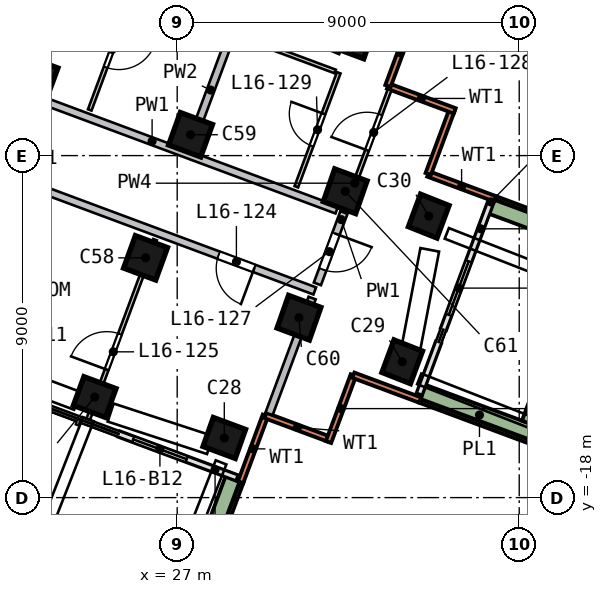
"""IFC4 building model, lengths in metres.
Left out: names, types, materials, properties, quantities, classifications, styles, units other than length and angle.
Written with IfcOpenShell. Run it as: python <this file> out.ifc"""

import sys

from ifc_helpers import new_model, si_unit, direction, frame, frame_2d, origin, origin_2d, place, context, subcontext, project, spatial, rectangle, extrude, element, fill, save


model = new_model("IFC4")
c1 = context("Model", 3, precision=1e-05, world=origin(), true_north=direction((0.0, 1.0)))
c2 = subcontext(c1, "Body", "Model", "MODEL_VIEW")
j1 = project(units=[si_unit("LENGTHUNIT", "METRE"), si_unit("PLANEANGLEUNIT", "RADIAN")], contexts=[c1])
p1 = place(None, origin())
s1 = spatial("IfcSite", under=j1, at=p1, CompositionType="ELEMENT")
p2 = place(p1, origin())
s2 = spatial("IfcBuilding", under=s1, at=p2, CompositionType="ELEMENT")
p3 = place(p2, frame((0.0, 0.0, 71.5)))
s3 = spatial("IfcBuildingStorey", under=s2, at=p3, CompositionType="ELEMENT", Elevation=71.5)
p4 = place(p3, frame((24.814, -15.523, 0.0), z_axis=(0.012570341, 0.13940186, 0.990156103), x_axis=(0.938411837, -0.343589736, 0.036459798)))
e1 = element("IfcColumn", 1, at=p4, inside=s3, PredefinedType="COLUMN", context=c2, shape_type="SweptSolid", body=[
    extrude(rectangle(XDim=0.9, YDim=0.8, at=origin_2d()), origin(), (0.0, 0.0, 1.0), 3.03),
])
p5 = place(p3, frame((28.29, -16.645, 0.0), z_axis=(-0.041940039, 0.175924056, 0.983509918), x_axis=(0.93778719, -0.332650547, 0.099492708)))
e2 = element("IfcColumn", 2, at=p5, inside=s3, PredefinedType="COLUMN", context=c2, shape_type="SweptSolid", body=[
    extrude(rectangle(XDim=0.9, YDim=0.8, at=origin_2d()), origin(), (0.0, 0.0, 1.0), 3.05),
])
p6 = place(p3, frame((32.984, -14.667, 0.0), z_axis=(-0.051152076, 0.197039072, 0.979060299), x_axis=(0.362492013, 0.917149263, -0.165640483)))
e3 = element("IfcColumn", 3, at=p6, inside=s3, PredefinedType="COLUMN", context=c2, shape_type="SweptSolid", body=[
    extrude(rectangle(XDim=0.9, YDim=0.8, at=origin_2d()), origin(), (0.0, 0.0, 1.0), 3.064),
])
p7 = place(p3, frame((33.704, -10.838, 0.0), z_axis=(-0.069039394, 0.19995972, 0.97736875), x_axis=(0.364959103, 0.916856458, -0.161799531)))
e4 = element("IfcColumn", 4, at=p7, inside=s3, PredefinedType="COLUMN", context=c2, shape_type="SweptSolid", body=[
    extrude(rectangle(XDim=0.9, YDim=0.8, at=origin_2d()), origin(), (0.0, 0.0, 1.0), 3.07),
])
p8 = place(p3, frame((31.726, -6.144, 0.0), z_axis=(-0.09100032, 0.190512033, 0.977457982), x_axis=(-0.934329354, 0.323309002, -0.149999824)))
e5 = element("IfcColumn", 5, at=p8, inside=s3, PredefinedType="COLUMN", context=c2, shape_type="SweptSolid", body=[
    extrude(rectangle(XDim=0.9, YDim=0.8, at=origin_2d()), origin(), (0.0, 0.0, 1.0), 3.069),
])
p9 = place(p3, frame((23.242, -7.097, 0.0), z_axis=(0.032819221, 0.110744661, 0.99330686), x_axis=(0.937521118, -0.347840819, 0.007805041)))
e6 = element("IfcColumn", 6, at=p9, inside=s3, PredefinedType="COLUMN", context=c2, shape_type="SweptSolid", body=[
    extrude(rectangle(XDim=0.9, YDim=0.9, at=origin_2d()), origin(), (0.0, 0.0, 1.0), 3.02),
])
p10 = place(p3, frame((26.173, -11.867, 0.0), z_axis=(-0.004750179, 0.145645326, 0.989325465), x_axis=(0.93834252, -0.341342946, 0.054756803)))
e7 = element("IfcColumn", 7, at=p10, inside=s3, PredefinedType="COLUMN", context=c2, shape_type="SweptSolid", body=[
    extrude(rectangle(XDim=0.9, YDim=0.9, at=origin_2d()), origin(), (0.0, 0.0, 1.0), 3.032),
])
p11 = place(p3, frame((27.375, -8.634, 0.0), z_axis=(-0.020107707, 0.150968666, 0.988334024), x_axis=(0.938195697, -0.338778763, 0.070836317)))
e8 = element("IfcColumn", 8, at=p11, inside=s3, PredefinedType="COLUMN", context=c2, shape_type="SweptSolid", body=[
    extrude(rectangle(XDim=0.9, YDim=0.9, at=origin_2d()), origin(), (0.0, 0.0, 1.0), 3.035),
])
p12 = place(p3, frame((30.274, -13.491, 0.0), z_axis=(-0.056771025, 0.184685488, 0.981156624), x_axis=(0.937151089, -0.329021737, 0.116157365)))
e9 = element("IfcColumn", 9, at=p12, inside=s3, PredefinedType="COLUMN", context=c2, shape_type="SweptSolid", body=[
    extrude(rectangle(XDim=0.9, YDim=0.9, at=origin_2d()), origin(), (0.0, 0.0, 1.0), 3.058),
])
p13 = place(p3, frame((31.509, -10.171, 0.0), z_axis=(-0.072272343, 0.189884226, 0.979142834), x_axis=(0.936136292, -0.325807394, 0.132281465)))
e10 = element("IfcColumn", 10, at=p13, inside=s3, PredefinedType="COLUMN", context=c2, shape_type="SweptSolid", body=[
    extrude(rectangle(XDim=0.9, YDim=0.9, at=origin_2d()), origin(), (0.0, 0.0, 1.0), 3.064),
])
p14 = place(p3, frame((28.667, -17.596, 0.0), z_axis=(0.0, 0.0, 1.0), x_axis=(0.34858209, 0.937278254, 0.0)))
e11 = element("IfcWall", 11, at=p14, inside=s3, PredefinedType="SOLIDWALL", context=c2, shape_type="SweptSolid", body=[
    extrude(rectangle(XDim=1.875, YDim=0.15, at=frame_2d((0.938, 0.0))), origin(), (0.0, 0.0, 1.0), 3.0),
])
p15 = place(p3, frame((29.321, -15.839, 0.0), z_axis=(0.0, 0.0, 1.0), x_axis=(0.93728987, -0.348550856, 0.0)))
e12 = element("IfcWall", 12, at=p15, inside=s3, PredefinedType="SOLIDWALL", context=c2, shape_type="SweptSolid", body=[
    extrude(rectangle(XDim=1.8, YDim=0.15, at=frame_2d((0.9, 0.0))), origin(), (0.0, 0.0, 1.0), 3.0),
])
for number, where, z_axis, x_axis in (
    (13, (30.982, -16.537, 0.0), (0.0, 0.0, 1.0), (0.349, 0.937, 0.0)),
    (14, (31.636, -14.779, 0.0), (0.0, 0.0, 1.0), (0.937, -0.349, 0.0)),
):
    element("IfcWall", number, at=place(p3, frame(where, z_axis=z_axis, x_axis=x_axis)), inside=s3, PredefinedType="SOLIDWALL", context=c2, shape_type="SweptSolid", body=[
        extrude(rectangle(XDim=1.875, YDim=0.15, at=frame_2d((0.938, 0.0))), origin(), (0.0, 0.0, 1.0), 3.0),
    ])
p16 = place(p3, frame((35.363, -10.137, 0.0), z_axis=(0.0, 0.0, 1.0), x_axis=(-0.937294074, 0.348539552, 0.0)))
e15 = element("IfcWall", 15, at=p16, inside=s3, PredefinedType="SOLIDWALL", context=c2, shape_type="SweptSolid", body=[
    extrude(rectangle(XDim=1.875, YDim=0.15, at=frame_2d((0.938, 0.0))), origin(), (0.0, 0.0, 1.0), 3.0),
])
p17 = place(p3, frame((33.605, -9.484, 0.0), z_axis=(0.0, 0.0, 1.0), x_axis=(0.348550856, 0.93728987, 0.0)))
e16 = element("IfcWall", 16, at=p17, inside=s3, PredefinedType="SOLIDWALL", context=c2, shape_type="SweptSolid", body=[
    extrude(rectangle(XDim=1.8, YDim=0.15, at=frame_2d((0.9, 0.0))), origin(), (0.0, 0.0, 1.0), 3.0),
])
for number, where, z_axis, x_axis in (
    (17, (34.303, -7.823, 0.0), (0.0, 0.0, 1.0), (-0.937, 0.349, 0.0)),
    (18, (32.545, -7.169, 0.0), (0.0, 0.0, 1.0), (0.349, 0.937, 0.0)),
):
    element("IfcWall", number, at=place(p3, frame(where, z_axis=z_axis, x_axis=x_axis)), inside=s3, PredefinedType="SOLIDWALL", context=c2, shape_type="SweptSolid", body=[
        extrude(rectangle(XDim=1.875, YDim=0.15, at=frame_2d((0.938, 0.0))), origin(), (0.0, 0.0, 1.0), 3.0),
    ])
p18 = place(p3, frame((25.468, -16.326, 0.0), z_axis=(0.0, 0.0, 1.0), x_axis=(0.937293311, -0.348541603, 0.0)))
e19 = element("IfcWall", 19, at=p18, inside=s3, PredefinedType="SOLIDWALL", context=c2, shape_type="SweptSolid", body=[
    extrude(rectangle(XDim=3.297, YDim=0.15, at=frame_2d((1.648, 0.0))), origin(), (0.0, 0.0, 1.0), 2.935),
])
p19 = place(p18, frame((0.4, 0.0, 0.0)))
e20 = element("IfcOpeningElement", 20, at=p19, cuts=e19, PredefinedType="OPENING", context=c2, shape_type="SweptSolid", body=[
    extrude(rectangle(XDim=1.5, YDim=2.4, at=frame_2d((0.75, 1.2))), frame((0.0, 0.085, 0.0), z_axis=(0.0, -1.0, 0.0), x_axis=(1.0, 0.0, 0.0)), (0.0, 0.0, 1.0), 0.17),
])
p20 = place(p3, frame((34.008, -13.565, 0.0), z_axis=(0.0, 0.0, 1.0), x_axis=(0.348575473, 0.937280716, 0.0)))
e21 = element("IfcWall", 21, at=p20, inside=s3, PredefinedType="SOLIDWALL", context=c2, shape_type="SweptSolid", body=[
    extrude(rectangle(XDim=3.53, YDim=0.15, at=frame_2d((1.765, 0.0))), origin(), (0.0, 0.0, 1.0), 2.935),
])
p21 = place(p20, frame((0.4, 0.0, 0.0)))
e22 = element("IfcOpeningElement", 22, at=p21, cuts=e21, PredefinedType="OPENING", context=c2, shape_type="SweptSolid", body=[
    extrude(rectangle(XDim=1.5, YDim=2.4, at=frame_2d((0.75, 1.2))), frame((0.0, 0.085, 0.0), z_axis=(0.0, -1.0, 0.0), x_axis=(1.0, 0.0, 0.0)), (0.0, 0.0, 1.0), 0.17),
])
p22 = place(p3, frame((33.377, -15.261, 0.0), z_axis=(0.0, 0.0, 1.0), x_axis=(0.348636151, 0.937258147, 0.0)))
e23 = element("IfcWall", 23, at=p22, inside=s3, PredefinedType="SOLIDWALL", context=c2, shape_type="SweptSolid", body=[
    extrude(rectangle(XDim=1.431, YDim=0.15, at=frame_2d((0.716, 0.0))), origin(), (0.0, 0.0, 1.0), 2.935),
])
p23 = place(p3, frame((21.175, -17.957, 0.0), z_axis=(0.0, 0.0, 1.0), x_axis=(0.937276934, -0.348585642, 0.0)))
e24 = element("IfcWall", 24, at=p23, inside=s3, PredefinedType="SOLIDWALL", context=c2, shape_type="SweptSolid", body=[
    extrude(rectangle(XDim=6.972, YDim=0.5, at=frame_2d((3.486, 0.0))), origin(), (0.0, 0.0, 1.0), 0.7),
])
p24 = place(p3, frame((27.562, -20.066, 0.0), z_axis=(0.0, 0.0, 1.0), x_axis=(0.348604368, 0.937269969, 0.0)))
e25 = element("IfcWall", 25, at=p24, inside=s3, PredefinedType="SOLIDWALL", context=c2, shape_type="SweptSolid", body=[
    extrude(rectangle(XDim=2.699, YDim=0.5, at=frame_2d((1.35, 0.0))), origin(), (0.0, 0.0, 1.0), 0.7),
])
p25 = place(p3, frame((33.455, -15.269, 0.0), z_axis=(0.0, 0.0, 1.0), x_axis=(0.937263611, -0.348621462, 0.0)))
e26 = element("IfcWall", 26, at=p25, inside=s3, PredefinedType="SOLIDWALL", context=c2, shape_type="SweptSolid", body=[
    extrude(rectangle(XDim=3.199, YDim=0.5, at=frame_2d((1.6, 0.0))), origin(), (0.0, 0.0, 1.0), 0.7),
])
p26 = place(p3, frame((36.306, -16.063, 0.0), z_axis=(0.0, 0.0, 1.0), x_axis=(0.348572797, 0.937281711, 0.0)))
e27 = element("IfcWall", 27, at=p26, inside=s3, PredefinedType="SOLIDWALL", context=c2, shape_type="SweptSolid", body=[
    extrude(rectangle(XDim=5.3, YDim=0.5, at=frame_2d((2.65, 0.0))), origin(), (0.0, 0.0, 1.0), 0.7),
])
p27 = place(p3, frame((37.832, -11.242, 0.0), z_axis=(0.0, 0.0, 1.0), x_axis=(-0.937258975, 0.348633924, 0.0)))
e28 = element("IfcWall", 28, at=p27, inside=s3, PredefinedType="SOLIDWALL", context=c2, shape_type="SweptSolid", body=[
    extrude(rectangle(XDim=2.699, YDim=0.5, at=frame_2d((1.35, 0.0))), origin(), (0.0, 0.0, 1.0), 0.7),
])
p28 = place(p3, frame((30.62, -12.561, 0.0), z_axis=(0.0, 0.0, 1.0), x_axis=(-0.937284552, 0.348565156, 0.0)))
e29 = element("IfcWall", 29, at=p28, inside=s3, PredefinedType="SOLIDWALL", context=c2, shape_type="SweptSolid", body=[
    extrude(rectangle(XDim=15.12, YDim=0.2, at=frame_2d((7.56, 0.0))), origin(), (0.0, 0.0, 1.0), 3.0),
])
p29 = place(p28, frame((1.7, 0.0, 0.0)))
e30 = element("IfcOpeningElement", 30, at=p29, cuts=e29, PredefinedType="OPENING", context=c2, shape_type="SweptSolid", body=[
    extrude(rectangle(XDim=1.0, YDim=2.1, at=frame_2d((0.5, 1.05))), frame((0.0, 0.11, 0.0), z_axis=(0.0, -1.0, 0.0), x_axis=(1.0, 0.0, 0.0)), (0.0, 0.0, 1.0), 0.22),
])
p30 = place(p3, frame((17.028, -5.159, 0.0), z_axis=(0.0, 0.0, 1.0), x_axis=(0.937277315, -0.348584617, 0.0)))
e31 = element("IfcWall", 31, at=p30, inside=s3, PredefinedType="SOLIDWALL", context=c2, shape_type="SweptSolid", body=[
    extrude(rectangle(XDim=15.12, YDim=0.2, at=frame_2d((7.56, 0.0))), origin(), (0.0, 0.0, 1.0), 3.0),
])
p31 = place(p30, frame((3.55, 0.0, 0.0)))
e32 = element("IfcOpeningElement", 32, at=p31, cuts=e31, PredefinedType="OPENING", context=c2, shape_type="SweptSolid", body=[
    extrude(rectangle(XDim=1.0, YDim=2.1, at=frame_2d((0.5, 1.05))), frame((0.0, 0.11, 0.0), z_axis=(0.0, -1.0, 0.0), x_axis=(1.0, 0.0, 0.0)), (0.0, 0.0, 1.0), 0.22),
])
p32 = place(p3, frame((31.388, -10.497, 0.0), z_axis=(0.0, 0.0, 1.0), x_axis=(-0.348571934, -0.937282031, 0.0)))
e33 = element("IfcWall", 33, at=p32, inside=s3, PredefinedType="SOLIDWALL", context=c2, shape_type="SweptSolid", body=[
    extrude(rectangle(XDim=2.004, YDim=0.2, at=frame_2d((1.002, 0.0))), origin(), (0.0, 0.0, 1.0), 3.0),
])
p33 = place(p32, frame((0.6, 0.0, 0.0)))
e34 = element("IfcOpeningElement", 34, at=p33, cuts=e33, PredefinedType="OPENING", context=c2, shape_type="SweptSolid", body=[
    extrude(rectangle(XDim=1.0, YDim=2.1, at=frame_2d((0.5, 1.05))), frame((0.0, 0.11, 0.0), z_axis=(0.0, -1.0, 0.0), x_axis=(1.0, 0.0, 0.0)), (0.0, 0.0, 1.0), 0.22),
])
p34 = place(p3, frame((27.323, -8.774, 0.0), z_axis=(0.0, 0.0, 1.0), x_axis=(0.348521741, 0.937300697, 0.0)))
e35 = element("IfcWall", 35, at=p34, inside=s3, PredefinedType="SOLIDWALL", context=c2, shape_type="SweptSolid", body=[
    extrude(rectangle(XDim=3.2, YDim=0.2, at=frame_2d((1.6, 0.0))), origin(), (0.0, 0.0, 1.0), 3.0),
])
p35 = place(p3, frame((30.55, -12.749, 0.0), z_axis=(0.0, 0.0, 1.0), x_axis=(-0.348561838, -0.937285786, 0.0)))
e36 = element("IfcWall", 36, at=p35, inside=s3, PredefinedType="SOLIDWALL", context=c2, shape_type="SweptSolid", body=[
    extrude(rectangle(XDim=3.25, YDim=0.2, at=frame_2d((1.625, 0.0))), origin(), (0.0, 0.0, 1.0), 3.0),
])
p36 = place(p3, frame((25.954, -4.424, 0.0), z_axis=(0.0, 0.0, 1.0), x_axis=(-0.348573011, -0.937281631, 0.0)))
e37 = element("IfcWall", 37, at=p36, inside=s3, PredefinedType="PARTITIONING", context=c2, shape_type="SweptSolid", body=[
    extrude(rectangle(XDim=3.6, YDim=0.1, at=frame_2d((1.8, 0.0))), origin(), (0.0, 0.0, 1.0), 3.0),
])
p37 = place(p36, frame((1.4, 0.0, 0.0)))
e38 = element("IfcOpeningElement", 38, at=p37, cuts=e37, PredefinedType="OPENING", context=c2, shape_type="SweptSolid", body=[
    extrude(rectangle(XDim=1.0, YDim=2.1, at=frame_2d((0.5, 1.05))), frame((0.0, 0.06, 0.0), z_axis=(0.0, -1.0, 0.0), x_axis=(1.0, 0.0, 0.0)), (0.0, 0.0, 1.0), 0.12),
])
p38 = place(p3, frame((24.657, -15.945, 0.0), z_axis=(0.0, 0.0, 1.0), x_axis=(0.348573718, 0.937281368, 0.0)))
e39 = element("IfcWall", 39, at=p38, inside=s3, PredefinedType="PARTITIONING", context=c2, shape_type="SweptSolid", body=[
    extrude(rectangle(XDim=5.05, YDim=0.1, at=frame_2d((2.525, 0.0))), origin(), (0.0, 0.0, 1.0), 3.0),
])
p39 = place(p38, frame((1.4, 0.0, 0.0)))
e40 = element("IfcOpeningElement", 40, at=p39, cuts=e39, PredefinedType="OPENING", context=c2, shape_type="SweptSolid", body=[
    extrude(rectangle(XDim=1.0, YDim=2.1, at=frame_2d((0.5, 1.05))), frame((0.0, 0.06, 0.0), z_axis=(0.0, -1.0, 0.0), x_axis=(1.0, 0.0, 0.0)), (0.0, 0.0, 1.0), 0.12),
])
p40 = place(p3, frame((31.157, -6.786, 0.0), z_axis=(0.0, 0.0, 1.0), x_axis=(-0.937313916, 0.348486189, 0.0)))
e41 = element("IfcWall", 41, at=p40, inside=s3, PredefinedType="PARTITIONING", context=c2, shape_type="SweptSolid", body=[
    extrude(rectangle(XDim=2.7, YDim=0.1, at=frame_2d((1.35, 0.0))), origin(), (0.0, 0.0, 1.0), 3.0),
])
p41 = place(p3, frame((30.135, -9.82, 0.0), z_axis=(0.0, 0.0, 1.0), x_axis=(0.348496819, 0.937309963, 0.0)))
e42 = element("IfcWall", 42, at=p41, inside=s3, PredefinedType="PARTITIONING", context=c2, shape_type="SweptSolid", body=[
    extrude(rectangle(XDim=3.2, YDim=0.1, at=frame_2d((1.6, 0.0))), origin(), (0.0, 0.0, 1.0), 3.0),
])
p42 = place(p41, frame((1.15, 0.0, 0.0)))
e43 = element("IfcOpeningElement", 43, at=p42, cuts=e42, PredefinedType="OPENING", context=c2, shape_type="SweptSolid", body=[
    extrude(rectangle(XDim=0.9, YDim=2.1, at=frame_2d((0.45, 1.05))), frame((0.0, 0.06, 0.0), z_axis=(0.0, -1.0, 0.0), x_axis=(1.0, 0.0, 0.0)), (0.0, 0.0, 1.0), 0.12),
])
p43 = place(p3, frame((31.422, -10.406, 0.0), z_axis=(0.0, 0.0, 1.0), x_axis=(0.348512016, 0.937304313, 0.0)))
e44 = element("IfcWall", 44, at=p43, inside=s3, PredefinedType="PARTITIONING", context=c2, shape_type="SweptSolid", body=[
    extrude(rectangle(XDim=3.352, YDim=0.1, at=frame_2d((1.676, 0.0))), origin(), (0.0, 0.0, 1.0), 3.0),
])
p44 = place(p43, frame((1.65, 0.0, 0.0)))
e45 = element("IfcOpeningElement", 45, at=p44, cuts=e44, PredefinedType="OPENING", context=c2, shape_type="SweptSolid", body=[
    extrude(rectangle(XDim=1.0, YDim=2.1, at=frame_2d((0.5, 1.05))), frame((0.0, 0.06, 0.0), z_axis=(0.0, -1.0, 0.0), x_axis=(1.0, 0.0, 0.0)), (0.0, 0.0, 1.0), 0.12),
])
p45 = place(p19, origin())
e46 = element("IfcDoor", 46, at=p45, inside=s3, OperationType="SLIDING_TO_RIGHT", PredefinedType="DOOR", context=c2, shape_type="SweptSolid", body=[
    extrude(rectangle(XDim=1.5, YDim=2.4, at=frame_2d((0.75, 1.2))), frame((0.0, 0.025, 0.0), z_axis=(0.0, -1.0, 0.0), x_axis=(1.0, 0.0, 0.0)), (0.0, 0.0, 1.0), 0.05),
])
fill(e20, e46)
p46 = place(p21, origin())
e47 = element("IfcDoor", 47, at=p46, inside=s3, OperationType="SLIDING_TO_RIGHT", PredefinedType="DOOR", context=c2, shape_type="SweptSolid", body=[
    extrude(rectangle(XDim=1.5, YDim=2.4, at=frame_2d((0.75, 1.2))), frame((0.0, 0.025, 0.0), z_axis=(0.0, -1.0, 0.0), x_axis=(1.0, 0.0, 0.0)), (0.0, 0.0, 1.0), 0.05),
])
fill(e22, e47)
p47 = place(p29, origin())
e48 = element("IfcDoor", 48, at=p47, inside=s3, OperationType="SINGLE_SWING_LEFT", PredefinedType="DOOR", context=c2, shape_type="SweptSolid", body=[
    extrude(rectangle(XDim=1.0, YDim=2.1, at=frame_2d((0.5, 1.05))), frame((0.0, 0.025, 0.0), z_axis=(0.0, -1.0, 0.0), x_axis=(1.0, 0.0, 0.0)), (0.0, 0.0, 1.0), 0.05),
])
fill(e30, e48)
p48 = place(p39, origin())
e49 = element("IfcDoor", 49, at=p48, inside=s3, OperationType="SINGLE_SWING_LEFT", PredefinedType="DOOR", context=c2, shape_type="SweptSolid", body=[
    extrude(rectangle(XDim=1.0, YDim=2.1, at=frame_2d((0.5, 1.05))), frame((0.0, 0.025, 0.0), z_axis=(0.0, -1.0, 0.0), x_axis=(1.0, 0.0, 0.0)), (0.0, 0.0, 1.0), 0.05),
])
fill(e40, e49)
p49 = place(p33, origin())
e50 = element("IfcDoor", 50, at=p49, inside=s3, OperationType="SINGLE_SWING_LEFT", PredefinedType="DOOR", context=c2, shape_type="SweptSolid", body=[
    extrude(rectangle(XDim=1.0, YDim=2.1, at=frame_2d((0.5, 1.05))), frame((0.0, 0.025, 0.0), z_axis=(0.0, -1.0, 0.0), x_axis=(1.0, 0.0, 0.0)), (0.0, 0.0, 1.0), 0.05),
])
fill(e34, e50)
p50 = place(p44, origin())
e51 = element("IfcDoor", 51, at=p50, inside=s3, OperationType="SINGLE_SWING_LEFT", PredefinedType="DOOR", context=c2, shape_type="SweptSolid", body=[
    extrude(rectangle(XDim=1.0, YDim=2.1, at=frame_2d((0.5, 1.05))), frame((0.0, 0.025, 0.0), z_axis=(0.0, -1.0, 0.0), x_axis=(1.0, 0.0, 0.0)), (0.0, 0.0, 1.0), 0.05),
])
fill(e45, e51)
p51 = place(p42, origin())
e52 = element("IfcDoor", 52, at=p51, inside=s3, OperationType="SINGLE_SWING_RIGHT", PredefinedType="DOOR", context=c2, shape_type="SweptSolid", body=[
    extrude(rectangle(XDim=0.9, YDim=2.1, at=frame_2d((0.45, 1.05))), frame((0.0, 0.025, 0.0), z_axis=(0.0, -1.0, 0.0), x_axis=(1.0, 0.0, 0.0)), (0.0, 0.0, 1.0), 0.05),
])
fill(e43, e52)
p52 = place(p37, origin())
e53 = element("IfcDoor", 53, at=p52, inside=s3, OperationType="SINGLE_SWING_LEFT", PredefinedType="DOOR", context=c2, shape_type="SweptSolid", body=[
    extrude(rectangle(XDim=1.0, YDim=2.1, at=frame_2d((0.5, 1.05))), frame((0.0, 0.025, 0.0), z_axis=(0.0, -1.0, 0.0), x_axis=(1.0, 0.0, 0.0)), (0.0, 0.0, 1.0), 0.05),
])
fill(e38, e53)
save(model, sys.argv[1])
